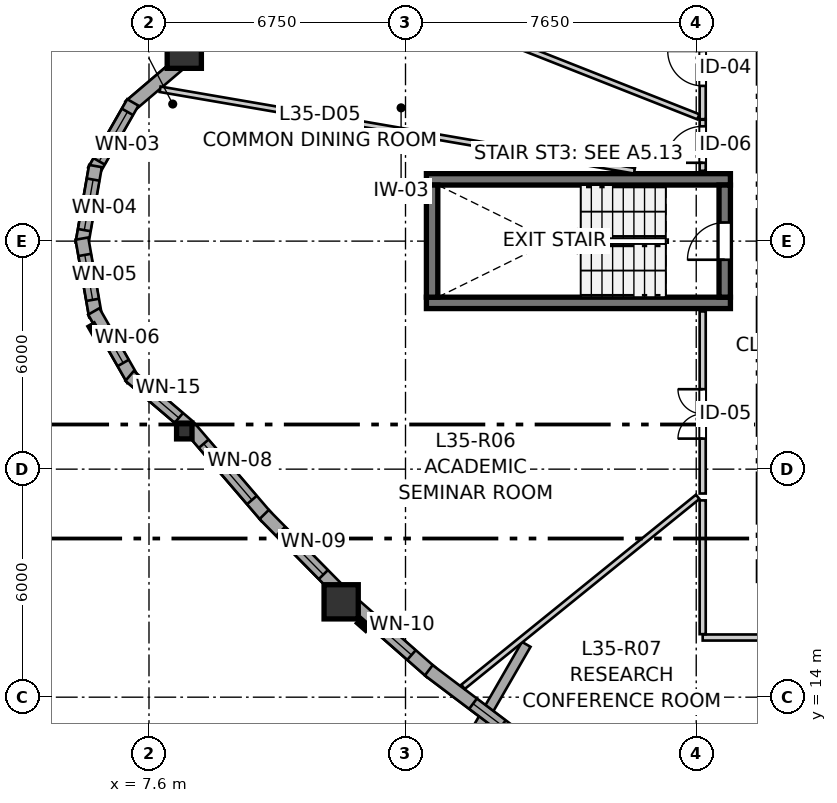
"""IFC4 building model, lengths in metres.
Left out: names, types, materials, properties, quantities, classifications, styles, units other than length and angle.
Written with IfcOpenShell. Run it as: python <this file> out.ifc"""

import sys

from ifc_helpers import new_model, si_unit, direction, frame, frame_2d, origin, origin_2d, place, context, subcontext, project, spatial, rectangle, i_section, extrude, source, transform, mapped, element, fill, save


model = new_model("IFC4")
c1 = context("Model", 3, precision=1e-05, world=origin(), true_north=direction((0.0, 1.0)))
c2 = subcontext(c1, "Body", "Model", "MODEL_VIEW")
j1 = project(units=[si_unit("LENGTHUNIT", "METRE"), si_unit("PLANEANGLEUNIT", "RADIAN")], contexts=[c1])
p1 = place(None, origin())
s1 = spatial("IfcSite", under=j1, at=p1, CompositionType="ELEMENT")
p2 = place(p1, origin())
s2 = spatial("IfcBuilding", under=s1, at=p2, CompositionType="ELEMENT")
p3 = place(p2, frame((0.0, 0.0, 118.4)))
s3 = spatial("IfcBuildingStorey", under=s2, at=p3, CompositionType="ELEMENT", Elevation=118.4)
for number, where, z_axis, x_axis in (
    (1, (14.9, 24.375, 0.0), (0.0, 0.0, 1.0), (1.0, 0.0, 0.0)),
    (2, (22.9, 27.625, 0.0), (0.0, 0.0, 1.0), (-1.0, 0.0, 0.0)),
):
    element("IfcWall", number, at=place(p3, frame(where, z_axis=z_axis, x_axis=x_axis)), inside=s3, PredefinedType="SHEAR", context=c2, shape_type="SweptSolid", body=[
        extrude(rectangle(XDim=8.0, YDim=0.3, at=frame_2d((4.0, 0.0))), origin(), (0.0, 0.0, 1.0), 2.95),
    ])
p4 = place(p3, frame((15.05, 27.475, 0.0), z_axis=(0.0, 0.0, 1.0), x_axis=(0.0, -1.0, 0.0)))
e3 = element("IfcWall", 3, at=p4, inside=s3, PredefinedType="SHEAR", context=c2, shape_type="SweptSolid", body=[
    extrude(rectangle(XDim=2.95, YDim=0.3, at=frame_2d((1.475, 0.0))), origin(), (0.0, 0.0, 1.0), 2.95),
])
p5 = place(p3, frame((22.75, 24.525, 0.0), z_axis=(0.0, 0.0, 1.0), x_axis=(0.0, 1.0, 0.0)))
e4 = element("IfcWall", 4, at=p5, inside=s3, PredefinedType="SHEAR", context=c2, shape_type="SweptSolid", body=[
    extrude(rectangle(XDim=2.95, YDim=0.3, at=frame_2d((1.475, 0.0))), origin(), (0.0, 0.0, 1.0), 2.95),
])
p6 = place(p5, frame((0.985, 0.0, 0.0)))
e5 = element("IfcOpeningElement", 5, at=p6, cuts=e4, PredefinedType="OPENING", context=c2, shape_type="SweptSolid", body=[
    extrude(rectangle(XDim=0.98, YDim=2.15, at=frame_2d((0.49, 1.075))), frame((0.0, 0.16, 0.0), z_axis=(0.0, -1.0, 0.0), x_axis=(1.0, 0.0, 0.0)), (0.0, 0.0, 1.0), 0.32),
])
m1 = source(origin(), c2, "Body", "SweptSolid", [
    extrude(rectangle(XDim=0.9, YDim=0.9, at=origin_2d()), origin(), (0.0, 0.0, 1.0), 2.95),
])
p7 = place(p3, frame((8.529, 30.996, 0.0), z_axis=(0.0, 0.0, 1.0), x_axis=(1.0, 0.0, 0.0)))
e6 = element("IfcColumn", 6, at=p7, inside=s3, PredefinedType="COLUMN", context=c2, shape_type="MappedRepresentation", body=[
    mapped(m1, transform((0.0, 0.0, 0.0), x_axis=(1.0, 0.0, 0.0), y_axis=(0.0, 1.0, 0.0), z_axis=(0.0, 0.0, 1.0), scale=1.0)),
])
m2 = source(origin(), c2, "Body", "SweptSolid", [
    extrude(i_section(OverallWidth=0.406, OverallDepth=0.416, WebThickness=0.027, FlangeThickness=0.044, FilletRadius=0.015, at=origin_2d()), origin(), (0.0, 0.0, 1.0), 2.95),
])
p8 = place(p3, frame((8.529, 21.004, 0.0), z_axis=(0.0, 0.0, 1.0), x_axis=(1.0, 0.0, 0.0)))
e7 = element("IfcColumn", 7, at=p8, inside=s3, PredefinedType="PILASTER", context=c2, shape_type="MappedRepresentation", body=[
    mapped(m2, transform((0.0, 0.0, 0.0), x_axis=(1.0, 0.0, 0.0), y_axis=(0.0, 1.0, 0.0), z_axis=(0.0, 0.0, 1.0), scale=1.0)),
])
p9 = place(p3, frame((12.657, 16.509, 0.0), z_axis=(0.0, 0.0, 1.0), x_axis=(1.0, 0.0, 0.0)))
e8 = element("IfcColumn", 8, at=p9, inside=s3, PredefinedType="COLUMN", context=c2, shape_type="MappedRepresentation", body=[
    mapped(m1, transform((0.0, 0.0, 0.0), x_axis=(1.0, 0.0, 0.0), y_axis=(0.0, 1.0, 0.0), z_axis=(0.0, 0.0, 1.0), scale=1.0)),
])
p10 = place(p3, frame((17.527, 15.39, 0.0), z_axis=(0.0, 0.0, 1.0), x_axis=(-0.499998939102, -0.866026016293, 0.0)))
e9 = element("IfcWall", 9, at=p10, inside=s3, PredefinedType="PARAPET", context=c2, shape_type="SweptSolid", body=[
    extrude(rectangle(XDim=20.51, YDim=0.26, at=frame_2d((10.255, 0.0))), origin(), (0.0, 0.0, 1.0), 0.55),
])
p11 = place(p3, frame((8.464, 30.718, 0.0), z_axis=(0.0, 0.0, 1.0), x_axis=(-0.76120118347, -0.648515811899, 0.0)))
e10 = element("IfcWall", 10, at=p11, inside=s3, PredefinedType="SOLIDWALL", context=c2, shape_type="SweptSolid", body=[
    extrude(rectangle(XDim=1.805, YDim=0.34, at=frame_2d((0.902, 0.0))), origin(), (0.0, 0.0, 1.0), 2.48),
])
p12 = place(p3, frame((7.175, 29.65, 0.0), z_axis=(0.0, 0.0, 1.0), x_axis=(-0.495999400124, -0.868322863385, 0.0)))
e11 = element("IfcWall", 11, at=p12, inside=s3, PredefinedType="SOLIDWALL", context=c2, shape_type="SweptSolid", body=[
    extrude(rectangle(XDim=2.073, YDim=0.34, at=frame_2d((1.036, 0.0))), origin(), (0.0, 0.0, 1.0), 2.48),
])
p13 = place(p12, frame((0.286, 0.0, 0.82)))
e12 = element("IfcOpeningElement", 12, at=p13, cuts=e11, PredefinedType="OPENING", context=c2, shape_type="SweptSolid", body=[
    extrude(rectangle(XDim=1.5, YDim=1.45, at=frame_2d((0.75, 0.725))), frame((0.0, 0.18, 0.0), z_axis=(0.0, -1.0, 0.0), x_axis=(1.0, 0.0, 0.0)), (0.0, 0.0, 1.0), 0.36),
])
p14 = place(p3, frame((6.192, 27.975, 0.0), z_axis=(0.0, 0.0, 1.0), x_axis=(-0.172186061474, -0.985064444711, 0.0)))
e13 = element("IfcWall", 13, at=p14, inside=s3, PredefinedType="SOLIDWALL", context=c2, shape_type="SweptSolid", body=[
    extrude(rectangle(XDim=2.073, YDim=0.34, at=frame_2d((1.037, 0.0))), origin(), (0.0, 0.0, 1.0), 2.48),
])
p15 = place(p14, frame((0.362, 0.0, 0.82)))
e14 = element("IfcOpeningElement", 14, at=p15, cuts=e13, PredefinedType="OPENING", context=c2, shape_type="SweptSolid", body=[
    extrude(rectangle(XDim=1.35, YDim=1.45, at=frame_2d((0.675, 0.725))), frame((0.0, 0.18, 0.0), z_axis=(0.0, -1.0, 0.0), x_axis=(1.0, 0.0, 0.0)), (0.0, 0.0, 1.0), 0.36),
])
p16 = place(p3, frame((5.835, 26.067, 0.0), z_axis=(0.0, 0.0, 1.0), x_axis=(0.172186061474, -0.985064444711, 0.0)))
e15 = element("IfcWall", 15, at=p16, inside=s3, PredefinedType="SOLIDWALL", context=c2, shape_type="SweptSolid", body=[
    extrude(rectangle(XDim=2.073, YDim=0.34, at=frame_2d((1.037, 0.0))), origin(), (0.0, 0.0, 1.0), 2.48),
])
p17 = place(p16, frame((0.437, 0.0, 0.82)))
e16 = element("IfcOpeningElement", 16, at=p17, cuts=e15, PredefinedType="OPENING", context=c2, shape_type="SweptSolid", body=[
    extrude(rectangle(XDim=1.2, YDim=1.45, at=frame_2d((0.6, 0.725))), frame((0.0, 0.18, 0.0), z_axis=(0.0, -1.0, 0.0), x_axis=(1.0, 0.0, 0.0)), (0.0, 0.0, 1.0), 0.36),
])
p18 = place(p3, frame((6.147, 24.15, 0.0), z_axis=(0.0, 0.0, 1.0), x_axis=(0.495999400124, -0.868322863385, 0.0)))
e17 = element("IfcWall", 17, at=p18, inside=s3, PredefinedType="SOLIDWALL", context=c2, shape_type="SweptSolid", body=[
    extrude(rectangle(XDim=2.073, YDim=0.34, at=frame_2d((1.036, 0.0))), origin(), (0.0, 0.0, 1.0), 2.48),
])
p19 = place(p18, frame((0.511, 0.0, 0.82)))
e18 = element("IfcOpeningElement", 18, at=p19, cuts=e17, PredefinedType="OPENING", context=c2, shape_type="SweptSolid", body=[
    extrude(rectangle(XDim=1.05, YDim=1.45, at=frame_2d((0.525, 0.725))), frame((0.0, 0.18, 0.0), z_axis=(0.0, -1.0, 0.0), x_axis=(1.0, 0.0, 0.0)), (0.0, 0.0, 1.0), 0.36),
])
p20 = place(p3, frame((7.09, 22.453, 0.0), z_axis=(0.0, 0.0, 1.0), x_axis=(0.761203352049, -0.648513266502, 0.0)))
e19 = element("IfcWall", 19, at=p20, inside=s3, PredefinedType="SOLIDWALL", context=c2, shape_type="SweptSolid", body=[
    extrude(rectangle(XDim=2.015, YDim=0.34, at=frame_2d((1.007, 0.0))), origin(), (0.0, 0.0, 1.0), 2.48),
])
p21 = place(p20, frame((0.252, 0.0, 0.82)))
e20 = element("IfcOpeningElement", 20, at=p21, cuts=e19, PredefinedType="OPENING", context=c2, shape_type="SweptSolid", body=[
    extrude(rectangle(XDim=1.45, YDim=1.25, at=frame_2d((0.725, 0.625))), frame((0.0, 0.18, 0.0), z_axis=(0.0, -1.0, 0.0), x_axis=(1.0, 0.0, 0.0)), (0.0, 0.0, 1.0), 0.36),
])
p22 = place(p3, frame((8.671, 21.099, 0.0), z_axis=(0.0, 0.0, 1.0), x_axis=(0.65073305839, -0.759306582823, 0.0)))
e21 = element("IfcWall", 21, at=p22, inside=s3, PredefinedType="SOLIDWALL", context=c2, shape_type="SweptSolid", body=[
    extrude(rectangle(XDim=3.103, YDim=0.34, at=frame_2d((1.552, 0.0))), origin(), (0.0, 0.0, 1.0), 2.48),
])
p23 = place(p22, frame((0.567, 0.0, 0.82)))
e22 = element("IfcOpeningElement", 22, at=p23, cuts=e21, PredefinedType="OPENING", context=c2, shape_type="SweptSolid", body=[
    extrude(rectangle(XDim=1.95, YDim=1.4, at=frame_2d((0.975, 0.7))), frame((0.0, 0.18, 0.0), z_axis=(0.0, -1.0, 0.0), x_axis=(1.0, 0.0, 0.0)), (0.0, 0.0, 1.0), 0.36),
])
p24 = place(p3, frame((10.631, 18.807, 0.0), z_axis=(0.0, 0.0, 1.0), x_axis=(0.701909586733, -0.712266054261, 0.0)))
e23 = element("IfcWall", 23, at=p24, inside=s3, PredefinedType="SOLIDWALL", context=c2, shape_type="SweptSolid", body=[
    extrude(rectangle(XDim=2.829, YDim=0.34, at=frame_2d((1.415, 0.0))), origin(), (0.0, 0.0, 1.0), 2.48),
])
p25 = place(p24, frame((0.619, 0.0, 0.82)))
e24 = element("IfcOpeningElement", 24, at=p25, cuts=e23, PredefinedType="OPENING", context=c2, shape_type="SweptSolid", body=[
    extrude(rectangle(XDim=1.6, YDim=1.35, at=frame_2d((0.8, 0.675))), frame((0.0, 0.18, 0.0), z_axis=(0.0, -1.0, 0.0), x_axis=(1.0, 0.0, 0.0)), (0.0, 0.0, 1.0), 0.36),
])
p26 = place(p3, frame((12.942, 16.485, 0.0), z_axis=(0.0, 0.0, 1.0), x_axis=(0.751427478967, -0.659815689305, 0.0)))
e25 = element("IfcWall", 25, at=p26, inside=s3, PredefinedType="SOLIDWALL", context=c2, shape_type="SweptSolid", body=[
    extrude(rectangle(XDim=2.78, YDim=0.34, at=frame_2d((1.39, 0.0))), origin(), (0.0, 0.0, 1.0), 2.48),
])
p27 = place(p26, frame((0.685, 0.0, 0.82)))
e26 = element("IfcOpeningElement", 26, at=p27, cuts=e25, PredefinedType="OPENING", context=c2, shape_type="SweptSolid", body=[
    extrude(rectangle(XDim=1.4, YDim=1.35, at=frame_2d((0.7, 0.675))), frame((0.0, 0.18, 0.0), z_axis=(0.0, -1.0, 0.0), x_axis=(1.0, 0.0, 0.0)), (0.0, 0.0, 1.0), 0.36),
])
p28 = place(p3, frame((14.962, 14.707, 0.0), z_axis=(0.0, 0.0, 1.0), x_axis=(0.798341968257, -0.602204368732, 0.0)))
e27 = element("IfcWall", 27, at=p28, inside=s3, PredefinedType="SOLIDWALL", context=c2, shape_type="SweptSolid", body=[
    extrude(rectangle(XDim=2.956, YDim=0.34, at=frame_2d((1.478, 0.0))), origin(), (0.0, 0.0, 1.0), 2.48),
])
p29 = place(p28, frame((1.46, 0.0, 0.82)))
e28 = element("IfcOpeningElement", 28, at=p29, cuts=e27, PredefinedType="OPENING", context=c2, shape_type="SweptSolid", body=[
    extrude(rectangle(XDim=0.95, YDim=1.35, at=frame_2d((0.475, 0.675))), frame((0.0, 0.18, 0.0), z_axis=(0.0, -1.0, 0.0), x_axis=(1.0, 0.0, 0.0)), (0.0, 0.0, 1.0), 0.36),
])
p30 = place(p3, frame((10.69, 33.257, 0.0), z_axis=(0.0, 0.0, 1.0), x_axis=(-0.650763576187, -0.759280427714, 0.0)))
e29 = element("IfcWall", 29, at=p30, inside=s3, PredefinedType="SOLIDWALL", context=c2, shape_type="SweptSolid", body=[
    extrude(rectangle(XDim=2.893, YDim=0.34, at=frame_2d((1.447, 0.0))), origin(), (0.0, 0.0, 1.0), 2.48),
])
p31 = place(p30, frame((0.552, 0.0, 0.82)))
e30 = element("IfcOpeningElement", 30, at=p31, cuts=e29, PredefinedType="OPENING", context=c2, shape_type="SweptSolid", body=[
    extrude(rectangle(XDim=1.8, YDim=1.45, at=frame_2d((0.9, 0.725))), frame((0.0, 0.18, 0.0), z_axis=(0.0, -1.0, 0.0), x_axis=(1.0, 0.0, 0.0)), (0.0, 0.0, 1.0), 0.36),
])
p32 = place(p3, frame((27.53, 15.57, 0.0), z_axis=(0.0, 0.0, 1.0), x_axis=(-1.0, 0.0, 0.0)))
e31 = element("IfcWall", 31, at=p32, inside=s3, PredefinedType="PARTITIONING", context=c2, shape_type="SweptSolid", body=[
    extrude(rectangle(XDim=5.36, YDim=0.16, at=frame_2d((2.68, 0.0))), origin(), (0.0, 0.0, 1.0), 2.95),
])
p33 = place(p32, frame((2.038, 0.0, 0.0)))
e32 = element("IfcOpeningElement", 32, at=p33, cuts=e31, PredefinedType="OPENING", context=c2, shape_type="SweptSolid", body=[
    extrude(rectangle(XDim=1.3, YDim=2.1, at=frame_2d((0.65, 1.05))), frame((0.0, 0.09, 0.0), z_axis=(0.0, -1.0, 0.0), x_axis=(1.0, 0.0, 0.0)), (0.0, 0.0, 1.0), 0.18),
])
p34 = place(p3, frame((22.17, 19.359, 0.0), z_axis=(0.0, 0.0, 1.0), x_axis=(0.0, 1.0, 0.0)))
e33 = element("IfcWall", 33, at=p34, inside=s3, PredefinedType="PARTITIONING", context=c2, shape_type="SweptSolid", body=[
    extrude(rectangle(XDim=4.791, YDim=0.16, at=frame_2d((2.396, 0.0))), origin(), (0.0, 0.0, 1.0), 2.95),
])
p35 = place(p34, frame((1.445, 0.0, 0.0)))
e34 = element("IfcOpeningElement", 34, at=p35, cuts=e33, PredefinedType="OPENING", context=c2, shape_type="SweptSolid", body=[
    extrude(rectangle(XDim=1.3, YDim=2.1, at=frame_2d((0.65, 1.05))), frame((0.0, 0.09, 0.0), z_axis=(0.0, -1.0, 0.0), x_axis=(1.0, 0.0, 0.0)), (0.0, 0.0, 1.0), 0.18),
])
p36 = place(p3, frame((22.17, 29.209, 0.0), z_axis=(0.0, 0.0, 1.0), x_axis=(0.0, 1.0, 0.0)))
e35 = element("IfcWall", 35, at=p36, inside=s3, PredefinedType="PARTITIONING", context=c2, shape_type="SweptSolid", body=[
    extrude(rectangle(XDim=2.62, YDim=0.16, at=frame_2d((1.31, 0.0))), origin(), (0.0, 0.0, 1.0), 2.95),
])
p37 = place(p36, frame((0.875, 0.0, 0.0)))
e36 = element("IfcOpeningElement", 36, at=p37, cuts=e35, PredefinedType="OPENING", context=c2, shape_type="SweptSolid", body=[
    extrude(rectangle(XDim=0.92, YDim=2.1, at=frame_2d((0.46, 1.05))), frame((0.0, 0.09, 0.0), z_axis=(0.0, -1.0, 0.0), x_axis=(1.0, 0.0, 0.0)), (0.0, 0.0, 1.0), 0.18),
])
p38 = place(p3, frame((22.17, 27.85, 0.0), z_axis=(0.0, 0.0, 1.0), x_axis=(0.0, 1.0, 0.0)))
e37 = element("IfcWall", 37, at=p38, inside=s3, PredefinedType="PARTITIONING", context=c2, shape_type="SweptSolid", body=[
    extrude(rectangle(XDim=1.344, YDim=0.16, at=frame_2d((0.672, 0.0))), origin(), (0.0, 0.0, 1.0), 2.95),
])
p39 = place(p38, frame((0.211, 0.0, 0.0)))
e38 = element("IfcOpeningElement", 38, at=p39, cuts=e37, PredefinedType="OPENING", context=c2, shape_type="SweptSolid", body=[
    extrude(rectangle(XDim=0.96, YDim=2.1, at=frame_2d((0.48, 1.05))), frame((0.0, 0.09, 0.0), z_axis=(0.0, -1.0, 0.0), x_axis=(1.0, 0.0, 0.0)), (0.0, 0.0, 1.0), 0.18),
])
p40 = place(p3, frame((7.893, 29.996, 0.0), z_axis=(0.0, 0.0, 1.0), x_axis=(0.985544917876, -0.169414328938, 0.0)))
e39 = element("IfcWall", 39, at=p40, inside=s3, PredefinedType="PARTITIONING", context=c2, shape_type="SweptSolid", body=[
    extrude(rectangle(XDim=12.664, YDim=0.145, at=frame_2d((6.332, 0.0))), origin(), (0.0, 0.0, 1.0), 2.95),
])
p41 = place(p3, frame((11.228, 33.54, 0.0), z_axis=(0.0, 0.0, 1.0), x_axis=(0.930301058265, -0.366796866114, 0.0)))
e40 = element("IfcWall", 40, at=p41, inside=s3, PredefinedType="PARTITIONING", context=c2, shape_type="SweptSolid", body=[
    extrude(rectangle(XDim=11.639, YDim=0.145, at=frame_2d((5.82, 0.0))), origin(), (0.0, 0.0, 1.0), 2.95),
])
p42 = place(p3, frame((15.863, 14.272, 0.0), z_axis=(0.0, 0.0, 1.0), x_axis=(0.77720694169, 0.629245079273, 0.0)))
e41 = element("IfcWall", 41, at=p42, inside=s3, PredefinedType="PARTITIONING", context=c2, shape_type="SweptSolid", body=[
    extrude(rectangle(XDim=7.945, YDim=0.145, at=frame_2d((3.972, 0.0))), origin(), (0.0, 0.0, 1.0), 2.95),
])
p43 = place(p3, frame((22.17, 15.658, 0.0), z_axis=(0.0, 0.0, 1.0), x_axis=(0.0, 1.0, 0.0)))
e42 = element("IfcWall", 42, at=p43, inside=s3, PredefinedType="PARTITIONING", context=c2, shape_type="SweptSolid", body=[
    extrude(rectangle(XDim=3.52, YDim=0.16, at=frame_2d((1.76, 0.0))), origin(), (0.0, 0.0, 1.0), 2.95),
])
m3 = source(origin(), c2, "Body", "SweptSolid", [
    extrude(rectangle(XDim=1.5, YDim=1.45, at=frame_2d((0.75, 0.725))), frame((0.0, 0.03, 0.0), z_axis=(0.0, -1.0, 0.0), x_axis=(1.0, 0.0, 0.0)), (0.0, 0.0, 1.0), 0.06),
])
p44 = place(p13, origin())
e43 = element("IfcWindow", 43, at=p44, inside=s3, PartitioningType="SINGLE_PANEL", PredefinedType="WINDOW", context=c2, shape_type="MappedRepresentation", body=[
    mapped(m3, transform((0.0, 0.0, 0.0), x_axis=(1.0, 0.0, 0.0), y_axis=(0.0, 1.0, 0.0), z_axis=(0.0, 0.0, 1.0), scale=1.0)),
])
fill(e12, e43)
m4 = source(origin(), c2, "Body", "SweptSolid", [
    extrude(rectangle(XDim=1.35, YDim=1.45, at=frame_2d((0.675, 0.725))), frame((0.0, 0.03, 0.0), z_axis=(0.0, -1.0, 0.0), x_axis=(1.0, 0.0, 0.0)), (0.0, 0.0, 1.0), 0.06),
])
p45 = place(p15, origin())
e44 = element("IfcWindow", 44, at=p45, inside=s3, PartitioningType="SINGLE_PANEL", PredefinedType="WINDOW", context=c2, shape_type="MappedRepresentation", body=[
    mapped(m4, transform((0.0, 0.0, 0.0), x_axis=(1.0, 0.0, 0.0), y_axis=(0.0, 1.0, 0.0), z_axis=(0.0, 0.0, 1.0), scale=1.0)),
])
fill(e14, e44)
m5 = source(origin(), c2, "Body", "SweptSolid", [
    extrude(rectangle(XDim=1.2, YDim=1.45, at=frame_2d((0.6, 0.725))), frame((0.0, 0.03, 0.0), z_axis=(0.0, -1.0, 0.0), x_axis=(1.0, 0.0, 0.0)), (0.0, 0.0, 1.0), 0.06),
])
p46 = place(p17, origin())
e45 = element("IfcWindow", 45, at=p46, inside=s3, PartitioningType="SINGLE_PANEL", PredefinedType="WINDOW", context=c2, shape_type="MappedRepresentation", body=[
    mapped(m5, transform((0.0, 0.0, 0.0), x_axis=(1.0, 0.0, 0.0), y_axis=(0.0, 1.0, 0.0), z_axis=(0.0, 0.0, 1.0), scale=1.0)),
])
fill(e16, e45)
m6 = source(origin(), c2, "Body", "SweptSolid", [
    extrude(rectangle(XDim=1.05, YDim=1.45, at=frame_2d((0.525, 0.725))), frame((0.0, 0.03, 0.0), z_axis=(0.0, -1.0, 0.0), x_axis=(1.0, 0.0, 0.0)), (0.0, 0.0, 1.0), 0.06),
])
p47 = place(p19, origin())
e46 = element("IfcWindow", 46, at=p47, inside=s3, PartitioningType="SINGLE_PANEL", PredefinedType="WINDOW", context=c2, shape_type="MappedRepresentation", body=[
    mapped(m6, transform((0.0, 0.0, 0.0), x_axis=(1.0, 0.0, 0.0), y_axis=(0.0, 1.0, 0.0), z_axis=(0.0, 0.0, 1.0), scale=1.0)),
])
fill(e18, e46)
m7 = source(origin(), c2, "Body", "SweptSolid", [
    extrude(rectangle(XDim=1.45, YDim=1.25, at=frame_2d((0.725, 0.625))), frame((0.0, 0.03, 0.0), z_axis=(0.0, -1.0, 0.0), x_axis=(1.0, 0.0, 0.0)), (0.0, 0.0, 1.0), 0.06),
])
p48 = place(p21, origin())
e47 = element("IfcWindow", 47, at=p48, inside=s3, PartitioningType="SINGLE_PANEL", PredefinedType="WINDOW", context=c2, shape_type="MappedRepresentation", body=[
    mapped(m7, transform((0.0, 0.0, 0.0), x_axis=(1.0, 0.0, 0.0), y_axis=(0.0, 1.0, 0.0), z_axis=(0.0, 0.0, 1.0), scale=1.0)),
])
fill(e20, e47)
m8 = source(origin(), c2, "Body", "SweptSolid", [
    extrude(rectangle(XDim=1.95, YDim=1.4, at=frame_2d((0.975, 0.7))), frame((0.0, 0.03, 0.0), z_axis=(0.0, -1.0, 0.0), x_axis=(1.0, 0.0, 0.0)), (0.0, 0.0, 1.0), 0.06),
])
p49 = place(p23, origin())
e48 = element("IfcWindow", 48, at=p49, inside=s3, PartitioningType="SINGLE_PANEL", PredefinedType="WINDOW", context=c2, shape_type="MappedRepresentation", body=[
    mapped(m8, transform((0.0, 0.0, 0.0), x_axis=(1.0, 0.0, 0.0), y_axis=(0.0, 1.0, 0.0), z_axis=(0.0, 0.0, 1.0), scale=1.0)),
])
fill(e22, e48)
m9 = source(origin(), c2, "Body", "SweptSolid", [
    extrude(rectangle(XDim=1.6, YDim=1.35, at=frame_2d((0.8, 0.675))), frame((0.0, 0.03, 0.0), z_axis=(0.0, -1.0, 0.0), x_axis=(1.0, 0.0, 0.0)), (0.0, 0.0, 1.0), 0.06),
])
p50 = place(p25, origin())
e49 = element("IfcWindow", 49, at=p50, inside=s3, PartitioningType="SINGLE_PANEL", PredefinedType="WINDOW", context=c2, shape_type="MappedRepresentation", body=[
    mapped(m9, transform((0.0, 0.0, 0.0), x_axis=(1.0, 0.0, 0.0), y_axis=(0.0, 1.0, 0.0), z_axis=(0.0, 0.0, 1.0), scale=1.0)),
])
fill(e24, e49)
m10 = source(origin(), c2, "Body", "SweptSolid", [
    extrude(rectangle(XDim=1.4, YDim=1.35, at=frame_2d((0.7, 0.675))), frame((0.0, 0.03, 0.0), z_axis=(0.0, -1.0, 0.0), x_axis=(1.0, 0.0, 0.0)), (0.0, 0.0, 1.0), 0.06),
])
p51 = place(p27, origin())
e50 = element("IfcWindow", 50, at=p51, inside=s3, PartitioningType="SINGLE_PANEL", PredefinedType="WINDOW", context=c2, shape_type="MappedRepresentation", body=[
    mapped(m10, transform((0.0, 0.0, 0.0), x_axis=(1.0, 0.0, 0.0), y_axis=(0.0, 1.0, 0.0), z_axis=(0.0, 0.0, 1.0), scale=1.0)),
])
fill(e26, e50)
m11 = source(origin(), c2, "Body", "SweptSolid", [
    extrude(rectangle(XDim=0.95, YDim=1.35, at=frame_2d((0.475, 0.675))), frame((0.0, 0.03, 0.0), z_axis=(0.0, -1.0, 0.0), x_axis=(1.0, 0.0, 0.0)), (0.0, 0.0, 1.0), 0.06),
])
p52 = place(p29, origin())
e51 = element("IfcWindow", 51, at=p52, inside=s3, PartitioningType="SINGLE_PANEL", PredefinedType="WINDOW", context=c2, shape_type="MappedRepresentation", body=[
    mapped(m11, transform((0.0, 0.0, 0.0), x_axis=(1.0, 0.0, 0.0), y_axis=(0.0, 1.0, 0.0), z_axis=(0.0, 0.0, 1.0), scale=1.0)),
])
fill(e28, e51)
m12 = source(origin(), c2, "Body", "SweptSolid", [
    extrude(rectangle(XDim=0.98, YDim=2.15, at=frame_2d((0.49, 1.075))), frame((0.0, 0.025, 0.0), z_axis=(0.0, -1.0, 0.0), x_axis=(1.0, 0.0, 0.0)), (0.0, 0.0, 1.0), 0.05),
])
p53 = place(p6, origin())
e52 = element("IfcDoor", 52, at=p53, inside=s3, OperationType="SINGLE_SWING_LEFT", PredefinedType="DOOR", context=c2, shape_type="MappedRepresentation", body=[
    mapped(m12, transform((0.0, 0.0, 0.0), x_axis=(1.0, 0.0, 0.0), y_axis=(0.0, 1.0, 0.0), z_axis=(0.0, 0.0, 1.0), scale=1.0)),
])
fill(e5, e52)
m13 = source(origin(), c2, "Body", "SweptSolid", [
    extrude(rectangle(XDim=1.3, YDim=2.1, at=frame_2d((0.65, 1.05))), frame((0.0, 0.025, 0.0), z_axis=(0.0, -1.0, 0.0), x_axis=(1.0, 0.0, 0.0)), (0.0, 0.0, 1.0), 0.05),
])
p54 = place(p35, origin())
e53 = element("IfcDoor", 53, at=p54, inside=s3, OperationType="DOUBLE_DOOR_SINGLE_SWING", PredefinedType="DOOR", context=c2, shape_type="MappedRepresentation", body=[
    mapped(m13, transform((0.0, 0.0, 0.0), x_axis=(1.0, 0.0, 0.0), y_axis=(0.0, 1.0, 0.0), z_axis=(0.0, 0.0, 1.0), scale=1.0)),
])
fill(e34, e53)
m14 = source(origin(), c2, "Body", "SweptSolid", [
    extrude(rectangle(XDim=0.92, YDim=2.1, at=frame_2d((0.46, 1.05))), frame((0.0, 0.025, 0.0), z_axis=(0.0, -1.0, 0.0), x_axis=(1.0, 0.0, 0.0)), (0.0, 0.0, 1.0), 0.05),
])
p55 = place(p37, origin())
e54 = element("IfcDoor", 54, at=p55, inside=s3, OperationType="SINGLE_SWING_RIGHT", PredefinedType="DOOR", context=c2, shape_type="MappedRepresentation", body=[
    mapped(m14, transform((0.0, 0.0, 0.0), x_axis=(1.0, 0.0, 0.0), y_axis=(0.0, 1.0, 0.0), z_axis=(0.0, 0.0, 1.0), scale=1.0)),
])
fill(e36, e54)
m15 = source(origin(), c2, "Body", "SweptSolid", [
    extrude(rectangle(XDim=0.96, YDim=2.1, at=frame_2d((0.48, 1.05))), frame((0.0, 0.025, 0.0), z_axis=(0.0, -1.0, 0.0), x_axis=(1.0, 0.0, 0.0)), (0.0, 0.0, 1.0), 0.05),
])
p56 = place(p39, origin())
e55 = element("IfcDoor", 55, at=p56, inside=s3, OperationType="SINGLE_SWING_LEFT", PredefinedType="DOOR", context=c2, shape_type="MappedRepresentation", body=[
    mapped(m15, transform((0.0, 0.0, 0.0), x_axis=(1.0, 0.0, 0.0), y_axis=(0.0, 1.0, 0.0), z_axis=(0.0, 0.0, 1.0), scale=1.0)),
])
fill(e38, e55)
save(model, sys.argv[1])
